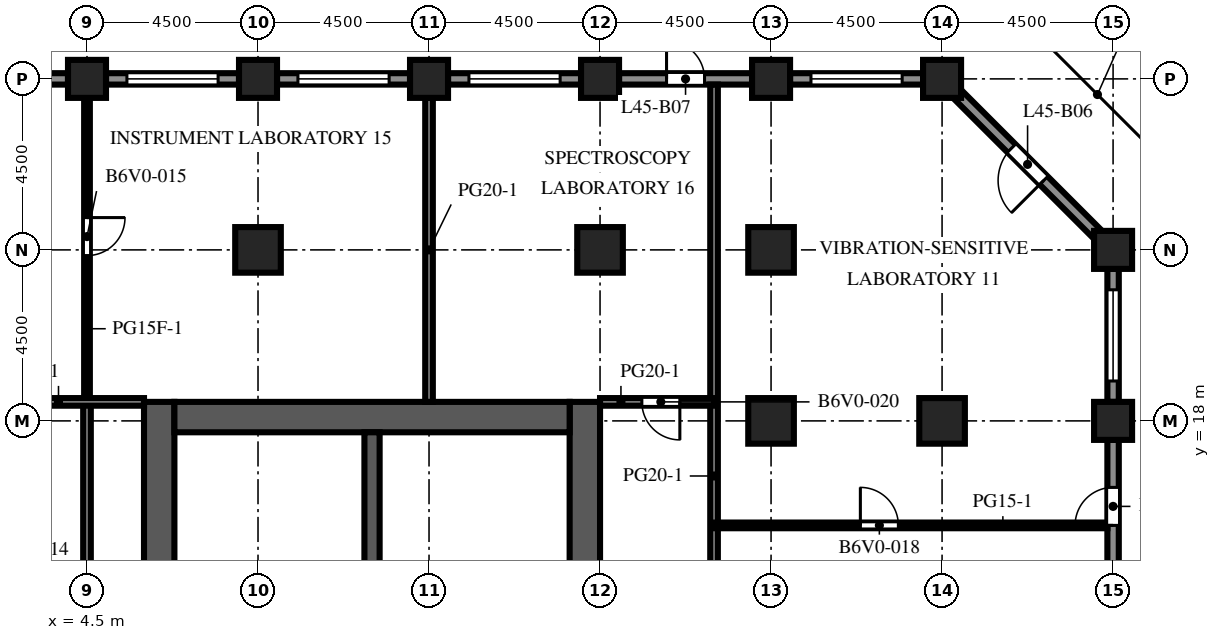
"""IFC4 building model, lengths in metres.
Left out: names, types, materials, properties, quantities, classifications, styles, units other than length and angle.
Written with IfcOpenShell. Run it as: python <this file> out.ifc"""

import sys

from ifc_helpers import new_model, si_unit, direction, frame, frame_2d, origin, origin_2d, place, context, subcontext, project, spatial, rectangle, extrude, element, fill, save


model = new_model("IFC4")
c1 = context("Model", 3, precision=1e-05, world=origin(), true_north=direction((0.0, 1.0)))
c2 = subcontext(c1, "Body", "Model", "MODEL_VIEW")
j1 = project(units=[si_unit("LENGTHUNIT", "METRE"), si_unit("PLANEANGLEUNIT", "RADIAN")], contexts=[c1])
p1 = place(None, origin())
s1 = spatial("IfcSite", under=j1, at=p1, CompositionType="ELEMENT")
p2 = place(p1, origin())
s2 = spatial("IfcBuilding", under=s1, at=p2, CompositionType="ELEMENT")
p3 = place(p2, frame((0.0, 0.0, 199.7)))
s3 = spatial("IfcBuildingStorey", under=s2, at=p3, CompositionType="ELEMENT", Elevation=199.7)
for number, where, z_axis, x_axis in (
    (1, (4.5, 27.0, 0.0), (0.0, 0.0, 1.0), (1.0, 0.0, 0.0)),
    (2, (9.0, 27.0, 0.0), (0.0, 0.0, 1.0), (1.0, 0.0, 0.0)),
    (3, (13.5, 27.0, 0.0), (0.0, 0.0, 1.0), (1.0, 0.0, 0.0)),
    (4, (18.0, 27.0, 0.0), (0.0, 0.0, 1.0), (1.0, 0.0, 0.0)),
    (5, (22.5, 27.0, 0.0), (0.0, 0.0, 1.0), (1.0, 0.0, 0.0)),
    (6, (27.0, 27.0, 0.0), (0.0, 0.0, 1.0), (1.0, 0.0, 0.0)),
    (7, (31.5, 18.0, 0.0), (0.0, 0.0, 1.0), (1.0, 0.0, 0.0)),
    (8, (31.5, 22.5, 0.0), (0.0, 0.0, 1.0), (1.0, 0.0, 0.0)),
):
    element("IfcColumn", number, at=place(p3, frame(where, z_axis=z_axis, x_axis=x_axis)), inside=s3, PredefinedType="COLUMN", context=c2, shape_type="SweptSolid", body=[
        extrude(rectangle(XDim=1.0, YDim=1.0, at=origin_2d()), origin(), (0.0, 0.0, 1.0), 4.1),
    ])
for number, where, z_axis, x_axis in (
    (9, (9.0, 22.5, 0.0), (0.0, 0.0, 1.0), (1.0, 0.0, 0.0)),
    (10, (18.0, 22.5, 0.0), (0.0, 0.0, 1.0), (1.0, 0.0, 0.0)),
    (11, (22.5, 18.0, 0.0), (0.0, 0.0, 1.0), (1.0, 0.0, 0.0)),
    (12, (22.5, 22.5, 0.0), (0.0, 0.0, 1.0), (1.0, 0.0, 0.0)),
    (13, (27.0, 18.0, 0.0), (0.0, 0.0, 1.0), (1.0, 0.0, 0.0)),
):
    element("IfcColumn", number, at=place(p3, frame(where, z_axis=z_axis, x_axis=x_axis)), inside=s3, PredefinedType="COLUMN", context=c2, shape_type="SweptSolid", body=[
        extrude(rectangle(XDim=1.2, YDim=1.2, at=origin_2d()), origin(), (0.0, 0.0, 1.0), 4.1),
    ])
p4 = place(p3, frame((6.4, -9.0, 0.0), z_axis=(0.0, 0.0, 1.0), x_axis=(0.0, 1.0, 0.0)))
e14 = element("IfcWall", 14, at=p4, inside=s3, PredefinedType="SHEAR", context=c2, shape_type="SweptSolid", body=[
    extrude(rectangle(XDim=27.5, YDim=0.8, at=frame_2d((13.75, 0.0))), origin(), (0.0, 0.0, 1.0), 4.1),
])
p5 = place(p4, frame((12.55, 0.0, 0.0)))
e15 = element("IfcOpeningElement", 15, at=p5, cuts=e14, PredefinedType="OPENING", context=c2, shape_type="SweptSolid", body=[
    extrude(rectangle(XDim=2.4, YDim=2.4, at=frame_2d((1.2, 1.2))), frame((0.0, 0.41, 0.0), z_axis=(0.0, -1.0, 0.0), x_axis=(1.0, 0.0, 0.0)), (0.0, 0.0, 1.0), 0.82),
])
p6 = place(p4, frame((3.95, 0.0, 0.0)))
e16 = element("IfcOpeningElement", 16, at=p6, cuts=e14, PredefinedType="OPENING", context=c2, shape_type="SweptSolid", body=[
    extrude(rectangle(XDim=1.2, YDim=2.1, at=frame_2d((0.6, 1.05))), frame((0.0, 0.41, 0.0), z_axis=(0.0, -1.0, 0.0), x_axis=(1.0, 0.0, 0.0)), (0.0, 0.0, 1.0), 0.82),
])
p7 = place(p4, frame((19.45, 0.0, 0.0)))
e17 = element("IfcOpeningElement", 17, at=p7, cuts=e14, PredefinedType="OPENING", context=c2, shape_type="SweptSolid", body=[
    extrude(rectangle(XDim=1.0, YDim=2.1, at=frame_2d((0.5, 1.05))), frame((0.0, 0.41, 0.0), z_axis=(0.0, -1.0, 0.0), x_axis=(1.0, 0.0, 0.0)), (0.0, 0.0, 1.0), 0.82),
])
p8 = place(p4, frame((21.137, 0.0, 0.0)))
e18 = element("IfcOpeningElement", 18, at=p8, cuts=e14, PredefinedType="OPENING", context=c2, shape_type="SweptSolid", body=[
    extrude(rectangle(XDim=1.0, YDim=2.1, at=frame_2d((0.5, 1.05))), frame((0.0, 0.41, 0.0), z_axis=(0.0, -1.0, 0.0), x_axis=(1.0, 0.0, 0.0)), (0.0, 0.0, 1.0), 0.82),
])
p9 = place(p4, frame((23.2, 0.0, 0.0)))
e19 = element("IfcOpeningElement", 19, at=p9, cuts=e14, PredefinedType="OPENING", context=c2, shape_type="SweptSolid", body=[
    extrude(rectangle(XDim=1.0, YDim=2.1, at=frame_2d((0.5, 1.05))), frame((0.0, 0.41, 0.0), z_axis=(0.0, -1.0, 0.0), x_axis=(1.0, 0.0, 0.0)), (0.0, 0.0, 1.0), 0.82),
])
p10 = place(p4, frame((25.262, 0.0, 0.0)))
e20 = element("IfcOpeningElement", 20, at=p10, cuts=e14, PredefinedType="OPENING", context=c2, shape_type="SweptSolid", body=[
    extrude(rectangle(XDim=1.0, YDim=2.1, at=frame_2d((0.5, 1.05))), frame((0.0, 0.41, 0.0), z_axis=(0.0, -1.0, 0.0), x_axis=(1.0, 0.0, 0.0)), (0.0, 0.0, 1.0), 0.82),
])
p11 = place(p3, frame((17.6, -9.0, 0.0), z_axis=(0.0, 0.0, 1.0), x_axis=(0.0, 1.0, 0.0)))
e21 = element("IfcWall", 21, at=p11, inside=s3, PredefinedType="SHEAR", context=c2, shape_type="SweptSolid", body=[
    extrude(rectangle(XDim=27.5, YDim=0.8, at=frame_2d((13.75, 0.0))), origin(), (0.0, 0.0, 1.0), 4.1),
])
p12 = place(p11, frame((12.55, 0.0, 0.0)))
e22 = element("IfcOpeningElement", 22, at=p12, cuts=e21, PredefinedType="OPENING", context=c2, shape_type="SweptSolid", body=[
    extrude(rectangle(XDim=2.4, YDim=2.4, at=frame_2d((1.2, 1.2))), frame((0.0, 0.41, 0.0), z_axis=(0.0, -1.0, 0.0), x_axis=(1.0, 0.0, 0.0)), (0.0, 0.0, 1.0), 0.82),
])
p13 = place(p11, frame((6.825, 0.0, 0.0)))
e23 = element("IfcOpeningElement", 23, at=p13, cuts=e21, PredefinedType="OPENING", context=c2, shape_type="SweptSolid", body=[
    extrude(rectangle(XDim=1.2, YDim=2.1, at=frame_2d((0.6, 1.05))), frame((0.0, 0.41, 0.0), z_axis=(0.0, -1.0, 0.0), x_axis=(1.0, 0.0, 0.0)), (0.0, 0.0, 1.0), 0.82),
])
p14 = place(p11, frame((19.475, 0.0, 0.0)))
e24 = element("IfcOpeningElement", 24, at=p14, cuts=e21, PredefinedType="OPENING", context=c2, shape_type="SweptSolid", body=[
    extrude(rectangle(XDim=1.2, YDim=2.1, at=frame_2d((0.6, 1.05))), frame((0.0, 0.41, 0.0), z_axis=(0.0, -1.0, 0.0), x_axis=(1.0, 0.0, 0.0)), (0.0, 0.0, 1.0), 0.82),
])
p15 = place(p3, frame((6.8, 18.1, 0.0), z_axis=(0.0, 0.0, 1.0), x_axis=(1.0, 0.0, 0.0)))
e25 = element("IfcWall", 25, at=p15, inside=s3, PredefinedType="SHEAR", context=c2, shape_type="SweptSolid", body=[
    extrude(rectangle(XDim=10.4, YDim=0.8, at=frame_2d((5.2, 0.0))), origin(), (0.0, 0.0, 1.0), 4.1),
])
p16 = place(p3, frame((12.0, 10.2, 0.0), z_axis=(0.0, 0.0, 1.0), x_axis=(0.0, 1.0, 0.0)))
e26 = element("IfcWall", 26, at=p16, inside=s3, PredefinedType="SHEAR", context=c2, shape_type="SweptSolid", body=[
    extrude(rectangle(XDim=7.5, YDim=0.4, at=frame_2d((3.75, 0.0))), origin(), (0.0, 0.0, 1.0), 4.1),
])
p17 = place(p3, frame((31.5, 17.5, 0.0), z_axis=(0.0, 0.0, 1.0), x_axis=(0.0, -1.0, 0.0)))
e27 = element("IfcWall", 27, at=p17, inside=s3, PredefinedType="SOLIDWALL", context=c2, shape_type="SweptSolid", body=[
    extrude(rectangle(XDim=3.5, YDim=0.3, at=frame_2d((1.75, 0.0))), origin(), (0.0, 0.0, 1.0), 2.85),
])
p18 = place(p17, frame((1.25, 0.0, 0.0)))
e28 = element("IfcOpeningElement", 28, at=p18, cuts=e27, PredefinedType="OPENING", context=c2, shape_type="SweptSolid", body=[
    extrude(rectangle(XDim=1.0, YDim=2.2, at=frame_2d((0.5, 1.1))), frame((0.0, 0.16, 0.0), z_axis=(0.0, -1.0, 0.0), x_axis=(1.0, 0.0, 0.0)), (0.0, 0.0, 1.0), 0.32),
])
p19 = place(p3, frame((31.5, 22.0, 0.0), z_axis=(0.0, 0.0, 1.0), x_axis=(0.0, -1.0, 0.0)))
e29 = element("IfcWall", 29, at=p19, inside=s3, PredefinedType="SOLIDWALL", context=c2, shape_type="SweptSolid", body=[
    extrude(rectangle(XDim=3.5, YDim=0.3, at=frame_2d((1.75, 0.0))), origin(), (0.0, 0.0, 1.0), 2.85),
])
p20 = place(p19, frame((0.55, 0.0, 0.8)))
e30 = element("IfcOpeningElement", 30, at=p20, cuts=e29, PredefinedType="OPENING", context=c2, shape_type="SweptSolid", body=[
    extrude(rectangle(XDim=2.4, YDim=1.7, at=frame_2d((1.2, 0.85))), frame((0.0, 0.16, 0.0), z_axis=(0.0, -1.0, 0.0), x_axis=(1.0, 0.0, 0.0)), (0.0, 0.0, 1.0), 0.32),
])
p21 = place(p3, frame((27.394, 26.606, 0.0), z_axis=(0.0, 0.0, 1.0), x_axis=(0.707106781187, -0.707106781187, 0.0)))
e31 = element("IfcWall", 31, at=p21, inside=s3, PredefinedType="SOLIDWALL", context=c2, shape_type="SweptSolid", body=[
    extrude(rectangle(XDim=5.25, YDim=0.3, at=frame_2d((2.625, 0.0))), origin(), (0.0, 0.0, 1.0), 2.85),
])
p22 = place(p21, frame((2.025, 0.0, 0.0)))
e32 = element("IfcOpeningElement", 32, at=p22, cuts=e31, PredefinedType="OPENING", context=c2, shape_type="SweptSolid", body=[
    extrude(rectangle(XDim=1.2, YDim=2.2, at=frame_2d((0.6, 1.1))), frame((0.0, 0.16, 0.0), z_axis=(0.0, -1.0, 0.0), x_axis=(1.0, 0.0, 0.0)), (0.0, 0.0, 1.0), 0.32),
])
p23 = place(p3, frame((23.0, 27.0, 0.0), z_axis=(0.0, 0.0, 1.0), x_axis=(1.0, 0.0, 0.0)))
e33 = element("IfcWall", 33, at=p23, inside=s3, PredefinedType="SOLIDWALL", context=c2, shape_type="SweptSolid", body=[
    extrude(rectangle(XDim=3.5, YDim=0.3, at=frame_2d((1.75, 0.0))), origin(), (0.0, 0.0, 1.0), 2.85),
])
p24 = place(p23, frame((0.55, 0.0, 0.8)))
e34 = element("IfcOpeningElement", 34, at=p24, cuts=e33, PredefinedType="OPENING", context=c2, shape_type="SweptSolid", body=[
    extrude(rectangle(XDim=2.4, YDim=1.7, at=frame_2d((1.2, 0.85))), frame((0.0, 0.16, 0.0), z_axis=(0.0, -1.0, 0.0), x_axis=(1.0, 0.0, 0.0)), (0.0, 0.0, 1.0), 0.32),
])
p25 = place(p3, frame((18.5, 27.0, 0.0), z_axis=(0.0, 0.0, 1.0), x_axis=(1.0, 0.0, 0.0)))
e35 = element("IfcWall", 35, at=p25, inside=s3, PredefinedType="SOLIDWALL", context=c2, shape_type="SweptSolid", body=[
    extrude(rectangle(XDim=3.5, YDim=0.3, at=frame_2d((1.75, 0.0))), origin(), (0.0, 0.0, 1.0), 2.85),
])
p26 = place(p25, frame((1.25, 0.0, 0.0)))
e36 = element("IfcOpeningElement", 36, at=p26, cuts=e35, PredefinedType="OPENING", context=c2, shape_type="SweptSolid", body=[
    extrude(rectangle(XDim=1.0, YDim=2.2, at=frame_2d((0.5, 1.1))), frame((0.0, 0.16, 0.0), z_axis=(0.0, -1.0, 0.0), x_axis=(1.0, 0.0, 0.0)), (0.0, 0.0, 1.0), 0.32),
])
p27 = place(p3, frame((14.0, 27.0, 0.0), z_axis=(0.0, 0.0, 1.0), x_axis=(1.0, 0.0, 0.0)))
e37 = element("IfcWall", 37, at=p27, inside=s3, PredefinedType="SOLIDWALL", context=c2, shape_type="SweptSolid", body=[
    extrude(rectangle(XDim=3.5, YDim=0.3, at=frame_2d((1.75, 0.0))), origin(), (0.0, 0.0, 1.0), 2.85),
])
p28 = place(p27, frame((0.55, 0.0, 0.8)))
e38 = element("IfcOpeningElement", 38, at=p28, cuts=e37, PredefinedType="OPENING", context=c2, shape_type="SweptSolid", body=[
    extrude(rectangle(XDim=2.4, YDim=1.7, at=frame_2d((1.2, 0.85))), frame((0.0, 0.16, 0.0), z_axis=(0.0, -1.0, 0.0), x_axis=(1.0, 0.0, 0.0)), (0.0, 0.0, 1.0), 0.32),
])
p29 = place(p3, frame((9.5, 27.0, 0.0), z_axis=(0.0, 0.0, 1.0), x_axis=(1.0, 0.0, 0.0)))
e39 = element("IfcWall", 39, at=p29, inside=s3, PredefinedType="SOLIDWALL", context=c2, shape_type="SweptSolid", body=[
    extrude(rectangle(XDim=3.5, YDim=0.3, at=frame_2d((1.75, 0.0))), origin(), (0.0, 0.0, 1.0), 2.85),
])
p30 = place(p29, frame((0.55, 0.0, 0.8)))
e40 = element("IfcOpeningElement", 40, at=p30, cuts=e39, PredefinedType="OPENING", context=c2, shape_type="SweptSolid", body=[
    extrude(rectangle(XDim=2.4, YDim=1.7, at=frame_2d((1.2, 0.85))), frame((0.0, 0.16, 0.0), z_axis=(0.0, -1.0, 0.0), x_axis=(1.0, 0.0, 0.0)), (0.0, 0.0, 1.0), 0.32),
])
p31 = place(p3, frame((5.0, 27.0, 0.0), z_axis=(0.0, 0.0, 1.0), x_axis=(1.0, 0.0, 0.0)))
e41 = element("IfcWall", 41, at=p31, inside=s3, PredefinedType="SOLIDWALL", context=c2, shape_type="SweptSolid", body=[
    extrude(rectangle(XDim=3.5, YDim=0.3, at=frame_2d((1.75, 0.0))), origin(), (0.0, 0.0, 1.0), 2.85),
])
p32 = place(p31, frame((0.55, 0.0, 0.8)))
e42 = element("IfcOpeningElement", 42, at=p32, cuts=e41, PredefinedType="OPENING", context=c2, shape_type="SweptSolid", body=[
    extrude(rectangle(XDim=2.4, YDim=1.7, at=frame_2d((1.2, 0.85))), frame((0.0, 0.16, 0.0), z_axis=(0.0, -1.0, 0.0), x_axis=(1.0, 0.0, 0.0)), (0.0, 0.0, 1.0), 0.32),
])
p33 = place(p3, frame((0.5, 27.0, 0.0), z_axis=(0.0, 0.0, 1.0), x_axis=(1.0, 0.0, 0.0)))
e43 = element("IfcWall", 43, at=p33, inside=s3, PredefinedType="SOLIDWALL", context=c2, shape_type="SweptSolid", body=[
    extrude(rectangle(XDim=3.5, YDim=0.3, at=frame_2d((1.75, 0.0))), origin(), (0.0, 0.0, 1.0), 2.85),
])
p34 = place(p33, frame((0.55, 0.0, 0.8)))
e44 = element("IfcOpeningElement", 44, at=p34, cuts=e43, PredefinedType="OPENING", context=c2, shape_type="SweptSolid", body=[
    extrude(rectangle(XDim=2.4, YDim=1.7, at=frame_2d((1.2, 0.85))), frame((0.0, 0.16, 0.0), z_axis=(0.0, -1.0, 0.0), x_axis=(1.0, 0.0, 0.0)), (0.0, 0.0, 1.0), 0.32),
])
p35 = place(p3, frame((6.8, 15.825, 0.0), z_axis=(0.0, 0.0, 1.0), x_axis=(1.0, 0.0, 0.0)))
e45 = element("IfcWall", 45, at=p35, inside=s3, PredefinedType="PARTITIONING", context=c2, shape_type="SweptSolid", body=[
    extrude(rectangle(XDim=5.0, YDim=0.1, at=frame_2d((2.5, 0.0))), origin(), (0.0, 0.0, 1.0), 3.65),
])
p36 = place(p3, frame((4.5, 26.5, 0.0), z_axis=(0.0, 0.0, 1.0), x_axis=(0.0, -1.0, 0.0)))
e46 = element("IfcWall", 46, at=p36, inside=s3, PredefinedType="PARTITIONING", context=c2, shape_type="SweptSolid", body=[
    extrude(rectangle(XDim=8.0, YDim=0.15, at=frame_2d((4.0, 0.0))), origin(), (0.0, 0.0, 1.0), 3.65),
])
p37 = place(p36, frame((3.15, 0.0, 0.0)))
e47 = element("IfcOpeningElement", 47, at=p37, cuts=e46, PredefinedType="OPENING", context=c2, shape_type="SweptSolid", body=[
    extrude(rectangle(XDim=1.0, YDim=2.1, at=frame_2d((0.5, 1.05))), frame((0.0, 0.085, 0.0), z_axis=(0.0, -1.0, 0.0), x_axis=(1.0, 0.0, 0.0)), (0.0, 0.0, 1.0), 0.17),
])
p38 = place(p3, frame((4.5, 18.5, 0.0), z_axis=(0.0, 0.0, 1.0), x_axis=(0.0, -1.0, 0.0)))
e48 = element("IfcWall", 48, at=p38, inside=s3, PredefinedType="PARTITIONING", context=c2, shape_type="SweptSolid", body=[
    extrude(rectangle(XDim=11.8, YDim=0.2, at=frame_2d((5.9, 0.0))), origin(), (0.0, 0.0, 1.0), 3.65),
])
p39 = place(p38, frame((4.95, 0.0, 0.0)))
e49 = element("IfcOpeningElement", 49, at=p39, cuts=e48, PredefinedType="OPENING", context=c2, shape_type="SweptSolid", body=[
    extrude(rectangle(XDim=1.0, YDim=2.1, at=frame_2d((0.5, 1.05))), frame((0.0, 0.11, 0.0), z_axis=(0.0, -1.0, 0.0), x_axis=(1.0, 0.0, 0.0)), (0.0, 0.0, 1.0), 0.22),
])
p40 = place(p3, frame((13.5, 18.5, 0.0), z_axis=(0.0, 0.0, 1.0), x_axis=(0.0, 1.0, 0.0)))
e50 = element("IfcWall", 50, at=p40, inside=s3, PredefinedType="PARTITIONING", context=c2, shape_type="SweptSolid", body=[
    extrude(rectangle(XDim=8.0, YDim=0.2, at=frame_2d((4.0, 0.0))), origin(), (0.0, 0.0, 1.0), 3.65),
])
p41 = place(p3, frame((21.0, 6.25, 0.0), z_axis=(0.0, 0.0, 1.0), x_axis=(0.0, 1.0, 0.0)))
e51 = element("IfcWall", 51, at=p41, inside=s3, PredefinedType="PARTITIONING", context=c2, shape_type="SweptSolid", body=[
    extrude(rectangle(XDim=20.6, YDim=0.2, at=frame_2d((10.3, 0.0))), origin(), (0.0, 0.0, 1.0), 3.65),
])
p42 = place(p3, frame((21.0, 15.25, 0.0), z_axis=(0.0, 0.0, 1.0), x_axis=(1.0, 0.0, 0.0)))
e52 = element("IfcWall", 52, at=p42, inside=s3, PredefinedType="PARTITIONING", context=c2, shape_type="SweptSolid", body=[
    extrude(rectangle(XDim=10.35, YDim=0.15, at=frame_2d((5.175, 0.0))), origin(), (0.0, 0.0, 1.0), 3.65),
])
p43 = place(p42, frame((3.85, 0.0, 0.0)))
e53 = element("IfcOpeningElement", 53, at=p43, cuts=e52, PredefinedType="OPENING", context=c2, shape_type="SweptSolid", body=[
    extrude(rectangle(XDim=1.0, YDim=2.1, at=frame_2d((0.5, 1.05))), frame((0.0, 0.085, 0.0), z_axis=(0.0, -1.0, 0.0), x_axis=(1.0, 0.0, 0.0)), (0.0, 0.0, 1.0), 0.17),
])
p44 = place(p3, frame((1.5, 18.5, 0.0), z_axis=(0.0, 0.0, 1.0), x_axis=(1.0, 0.0, 0.0)))
e54 = element("IfcWall", 54, at=p44, inside=s3, PredefinedType="PARTITIONING", context=c2, shape_type="SweptSolid", body=[
    extrude(rectangle(XDim=4.5, YDim=0.2, at=frame_2d((2.25, 0.0))), origin(), (0.0, 0.0, 1.0), 3.65),
])
p45 = place(p3, frame((18.0, 18.5, 0.0), z_axis=(0.0, 0.0, 1.0), x_axis=(1.0, 0.0, 0.0)))
e55 = element("IfcWall", 55, at=p45, inside=s3, PredefinedType="PARTITIONING", context=c2, shape_type="SweptSolid", body=[
    extrude(rectangle(XDim=3.0, YDim=0.2, at=frame_2d((1.5, 0.0))), origin(), (0.0, 0.0, 1.0), 3.65),
])
p46 = place(p45, frame((1.1, 0.0, 0.0)))
e56 = element("IfcOpeningElement", 56, at=p46, cuts=e55, PredefinedType="OPENING", context=c2, shape_type="SweptSolid", body=[
    extrude(rectangle(XDim=1.0, YDim=2.1, at=frame_2d((0.5, 1.05))), frame((0.0, 0.11, 0.0), z_axis=(0.0, -1.0, 0.0), x_axis=(1.0, 0.0, 0.0)), (0.0, 0.0, 1.0), 0.22),
])
p47 = place(p18, origin())
e57 = element("IfcDoor", 57, at=p47, inside=s3, OperationType="SINGLE_SWING_RIGHT", PredefinedType="DOOR", context=c2, shape_type="SweptSolid", body=[
    extrude(rectangle(XDim=1.0, YDim=2.2, at=frame_2d((0.5, 1.1))), frame((0.0, 0.025, 0.0), z_axis=(0.0, -1.0, 0.0), x_axis=(1.0, 0.0, 0.0)), (0.0, 0.0, 1.0), 0.05),
])
fill(e28, e57)
p48 = place(p20, origin())
e58 = element("IfcWindow", 58, at=p48, inside=s3, PartitioningType="SINGLE_PANEL", PredefinedType="WINDOW", context=c2, shape_type="SweptSolid", body=[
    extrude(rectangle(XDim=2.4, YDim=1.7, at=frame_2d((1.2, 0.85))), frame((0.0, 0.03, 0.0), z_axis=(0.0, -1.0, 0.0), x_axis=(1.0, 0.0, 0.0)), (0.0, 0.0, 1.0), 0.06),
])
fill(e30, e58)
p49 = place(p22, origin())
e59 = element("IfcDoor", 59, at=p49, inside=s3, OperationType="SINGLE_SWING_RIGHT", PredefinedType="DOOR", context=c2, shape_type="SweptSolid", body=[
    extrude(rectangle(XDim=1.2, YDim=2.2, at=frame_2d((0.6, 1.1))), frame((0.0, 0.025, 0.0), z_axis=(0.0, -1.0, 0.0), x_axis=(1.0, 0.0, 0.0)), (0.0, 0.0, 1.0), 0.05),
])
fill(e32, e59)
p50 = place(p24, origin())
e60 = element("IfcWindow", 60, at=p50, inside=s3, PartitioningType="SINGLE_PANEL", PredefinedType="WINDOW", context=c2, shape_type="SweptSolid", body=[
    extrude(rectangle(XDim=2.4, YDim=1.7, at=frame_2d((1.2, 0.85))), frame((0.0, 0.03, 0.0), z_axis=(0.0, -1.0, 0.0), x_axis=(1.0, 0.0, 0.0)), (0.0, 0.0, 1.0), 0.06),
])
fill(e34, e60)
p51 = place(p26, origin())
e61 = element("IfcDoor", 61, at=p51, inside=s3, OperationType="SINGLE_SWING_LEFT", PredefinedType="DOOR", context=c2, shape_type="SweptSolid", body=[
    extrude(rectangle(XDim=1.0, YDim=2.2, at=frame_2d((0.5, 1.1))), frame((0.0, 0.025, 0.0), z_axis=(0.0, -1.0, 0.0), x_axis=(1.0, 0.0, 0.0)), (0.0, 0.0, 1.0), 0.05),
])
fill(e36, e61)
p52 = place(p28, origin())
e62 = element("IfcWindow", 62, at=p52, inside=s3, PartitioningType="SINGLE_PANEL", PredefinedType="WINDOW", context=c2, shape_type="SweptSolid", body=[
    extrude(rectangle(XDim=2.4, YDim=1.7, at=frame_2d((1.2, 0.85))), frame((0.0, 0.03, 0.0), z_axis=(0.0, -1.0, 0.0), x_axis=(1.0, 0.0, 0.0)), (0.0, 0.0, 1.0), 0.06),
])
fill(e38, e62)
p53 = place(p30, origin())
e63 = element("IfcWindow", 63, at=p53, inside=s3, PartitioningType="SINGLE_PANEL", PredefinedType="WINDOW", context=c2, shape_type="SweptSolid", body=[
    extrude(rectangle(XDim=2.4, YDim=1.7, at=frame_2d((1.2, 0.85))), frame((0.0, 0.03, 0.0), z_axis=(0.0, -1.0, 0.0), x_axis=(1.0, 0.0, 0.0)), (0.0, 0.0, 1.0), 0.06),
])
fill(e40, e63)
p54 = place(p32, origin())
e64 = element("IfcWindow", 64, at=p54, inside=s3, PartitioningType="SINGLE_PANEL", PredefinedType="WINDOW", context=c2, shape_type="SweptSolid", body=[
    extrude(rectangle(XDim=2.4, YDim=1.7, at=frame_2d((1.2, 0.85))), frame((0.0, 0.03, 0.0), z_axis=(0.0, -1.0, 0.0), x_axis=(1.0, 0.0, 0.0)), (0.0, 0.0, 1.0), 0.06),
])
fill(e42, e64)
p55 = place(p9, origin())
e65 = element("IfcDoor", 65, at=p55, inside=s3, OperationType="SINGLE_SWING_RIGHT", PredefinedType="DOOR", context=c2, shape_type="SweptSolid", body=[
    extrude(rectangle(XDim=1.0, YDim=2.1, at=frame_2d((0.5, 1.05))), frame((0.0, -0.325, 0.0), z_axis=(0.0, -1.0, 0.0), x_axis=(1.0, 0.0, 0.0)), (0.0, 0.0, 1.0), 0.05),
])
fill(e19, e65)
p56 = place(p10, origin())
e66 = element("IfcDoor", 66, at=p56, inside=s3, OperationType="SINGLE_SWING_LEFT", PredefinedType="DOOR", context=c2, shape_type="SweptSolid", body=[
    extrude(rectangle(XDim=1.0, YDim=2.1, at=frame_2d((0.5, 1.05))), frame((0.0, -0.325, 0.0), z_axis=(0.0, -1.0, 0.0), x_axis=(1.0, 0.0, 0.0)), (0.0, 0.0, 1.0), 0.05),
])
fill(e20, e66)
p57 = place(p37, origin())
e67 = element("IfcDoor", 67, at=p57, inside=s3, OperationType="SINGLE_SWING_LEFT", PredefinedType="DOOR", context=c2, shape_type="SweptSolid", body=[
    extrude(rectangle(XDim=1.0, YDim=2.1, at=frame_2d((0.5, 1.05))), frame((0.0, 0.025, 0.0), z_axis=(0.0, -1.0, 0.0), x_axis=(1.0, 0.0, 0.0)), (0.0, 0.0, 1.0), 0.05),
])
fill(e47, e67)
p58 = place(p43, origin())
e68 = element("IfcDoor", 68, at=p58, inside=s3, OperationType="SINGLE_SWING_LEFT", PredefinedType="DOOR", context=c2, shape_type="SweptSolid", body=[
    extrude(rectangle(XDim=1.0, YDim=2.1, at=frame_2d((0.5, 1.05))), frame((0.0, 0.025, 0.0), z_axis=(0.0, -1.0, 0.0), x_axis=(1.0, 0.0, 0.0)), (0.0, 0.0, 1.0), 0.05),
])
fill(e53, e68)
p59 = place(p46, origin())
e69 = element("IfcDoor", 69, at=p59, inside=s3, OperationType="SINGLE_SWING_RIGHT", PredefinedType="DOOR", context=c2, shape_type="SweptSolid", body=[
    extrude(rectangle(XDim=1.0, YDim=2.1, at=frame_2d((0.5, 1.05))), frame((0.0, 0.025, 0.0), z_axis=(0.0, -1.0, 0.0), x_axis=(1.0, 0.0, 0.0)), (0.0, 0.0, 1.0), 0.05),
])
fill(e56, e69)
save(model, sys.argv[1])
